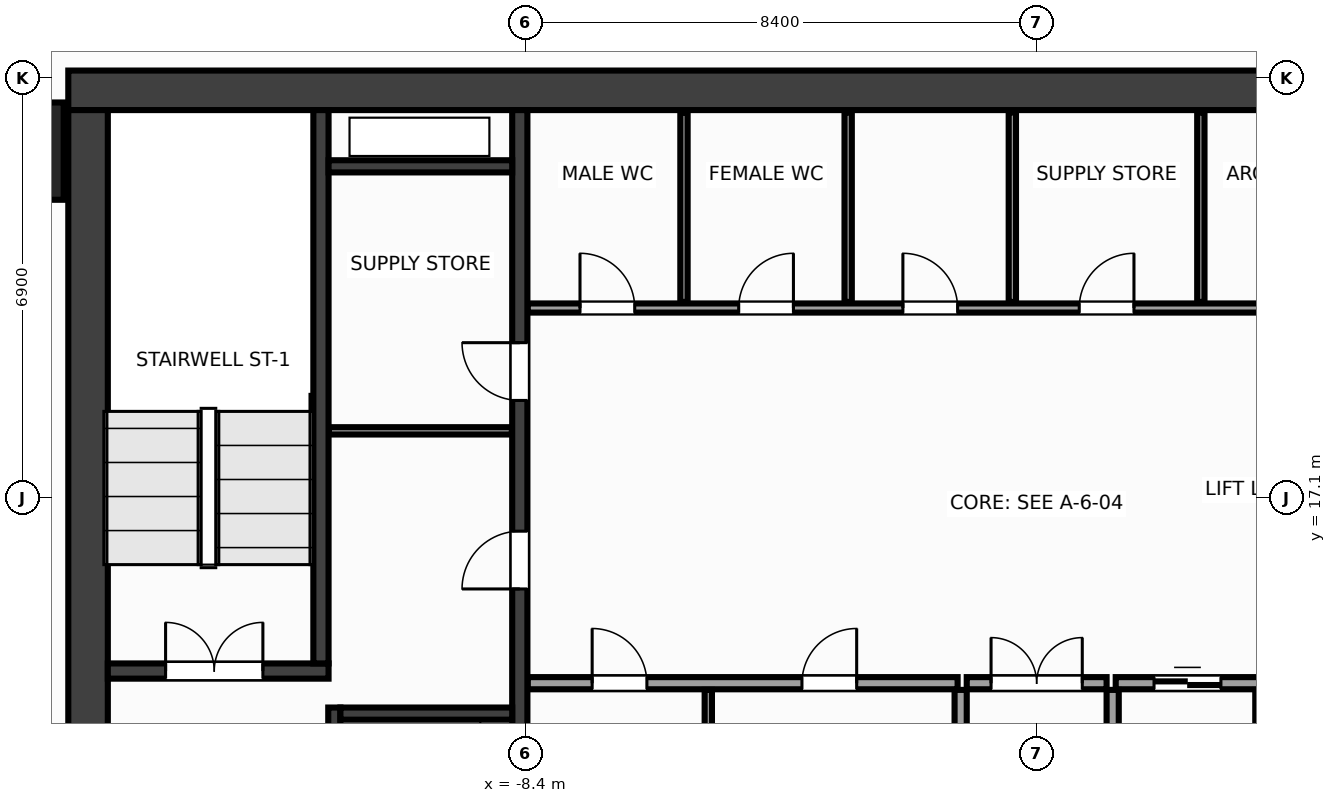
"""IFC4 building model, lengths in metres.
Left out: names, types, materials, properties, quantities, classifications, styles, units other than length and angle.
Written with IfcOpenShell. Run it as: python <this file> out.ifc"""

import sys

from ifc_helpers import new_model, si_unit, direction, frame, frame_2d, origin, origin_2d, place, context, subcontext, project, spatial, rectangle, extrude, source, transform, mapped, element, fill, save


model = new_model("IFC4")
c1 = context("Model", 3, precision=1e-05, world=origin(), true_north=direction((0.0, 1.0)))
c2 = subcontext(c1, "Body", "Model", "MODEL_VIEW")
j1 = project(units=[si_unit("LENGTHUNIT", "METRE"), si_unit("PLANEANGLEUNIT", "RADIAN")], contexts=[c1])
p1 = place(None, origin())
s1 = spatial("IfcSite", under=j1, at=p1, CompositionType="ELEMENT")
p2 = place(p1, origin())
s2 = spatial("IfcBuilding", under=s1, at=p2, CompositionType="ELEMENT")
p3 = place(p2, frame((0.0, 0.0, 95.6)))
s3 = spatial("IfcBuildingStorey", under=s2, at=p3, CompositionType="ELEMENT", Elevation=95.6)
m1 = source(origin(), c2, "Body", "SweptSolid", [
    extrude(rectangle(XDim=31.85, YDim=0.65, at=frame_2d((15.925, 0.0))), origin(), (0.0, 0.0, 1.0), 3.6),
])
p4 = place(p3, frame((-15.925, 23.8, 0.0), z_axis=(0.0, 0.0, 1.0), x_axis=(1.0, 0.0, 0.0)))
e1 = element("IfcWall", 1, at=p4, inside=s3, PredefinedType="SHEAR", context=c2, shape_type="MappedRepresentation", body=[
    mapped(m1, transform((0.0, 0.0, 0.0), x_axis=(1.0, 0.0, 0.0), y_axis=(0.0, 1.0, 0.0), z_axis=(0.0, 0.0, 1.0), scale=1.0)),
])
m2 = source(origin(), c2, "Body", "SweptSolid", [
    extrude(rectangle(XDim=12.95, YDim=0.65, at=frame_2d((6.475, 0.0))), origin(), (0.0, 0.0, 1.0), 3.6),
])
p5 = place(p3, frame((-15.6, 10.525, 0.0), z_axis=(0.0, 0.0, 1.0), x_axis=(0.0, 1.0, 0.0)))
e2 = element("IfcWall", 2, at=p5, inside=s3, PredefinedType="SHEAR", context=c2, shape_type="MappedRepresentation", body=[
    mapped(m2, transform((0.0, 0.0, 0.0), x_axis=(1.0, 0.0, 0.0), y_axis=(0.0, 1.0, 0.0), z_axis=(0.0, 0.0, 1.0), scale=1.0)),
])
m3 = source(origin(), c2, "Body", "SweptSolid", [
    extrude(rectangle(XDim=12.95, YDim=0.25, at=frame_2d((6.475, 0.0))), origin(), (0.0, 0.0, 1.0), 3.6),
])
p6 = place(p3, frame((-8.5, 10.525, 0.0), z_axis=(0.0, 0.0, 1.0), x_axis=(0.0, 1.0, 0.0)))
e3 = element("IfcWall", 3, at=p6, inside=s3, PredefinedType="SHEAR", context=c2, shape_type="MappedRepresentation", body=[
    mapped(m3, transform((0.0, 0.0, 0.0), x_axis=(1.0, 0.0, 0.0), y_axis=(0.0, 1.0, 0.0), z_axis=(0.0, 0.0, 1.0), scale=1.0)),
])
p7 = place(p6, frame((5.075, 0.0, 0.0)))
e4 = element("IfcOpeningElement", 4, at=p7, cuts=e3, PredefinedType="OPENING", context=c2, shape_type="SweptSolid", body=[
    extrude(rectangle(XDim=0.95, YDim=2.15, at=frame_2d((0.475, 1.075))), frame((0.0, 0.137, 0.0), z_axis=(0.0, -1.0, 0.0), x_axis=(1.0, 0.0, 0.0)), (0.0, 0.0, 1.0), 0.274),
])
p8 = place(p6, frame((8.175, 0.0, 0.0)))
e5 = element("IfcOpeningElement", 5, at=p8, cuts=e3, PredefinedType="OPENING", context=c2, shape_type="SweptSolid", body=[
    extrude(rectangle(XDim=0.95, YDim=2.15, at=frame_2d((0.475, 1.075))), frame((0.0, 0.137, 0.0), z_axis=(0.0, -1.0, 0.0), x_axis=(1.0, 0.0, 0.0)), (0.0, 0.0, 1.0), 0.274),
])
m4 = source(origin(), c2, "Body", "SweptSolid", [
    extrude(rectangle(XDim=3.63, YDim=0.25, at=frame_2d((1.815, 0.0))), origin(), (0.0, 0.0, 1.0), 3.6),
])
p9 = place(p3, frame((-15.275, 14.25, 0.0), z_axis=(0.0, 0.0, 1.0), x_axis=(1.0, 0.0, 0.0)))
e6 = element("IfcWall", 6, at=p9, inside=s3, PredefinedType="SHEAR", context=c2, shape_type="MappedRepresentation", body=[
    mapped(m4, transform((0.0, 0.0, 0.0), x_axis=(1.0, 0.0, 0.0), y_axis=(0.0, 1.0, 0.0), z_axis=(0.0, 0.0, 1.0), scale=1.0)),
])
p10 = place(p9, frame((0.95, 0.0, 0.0)))
e7 = element("IfcOpeningElement", 7, at=p10, cuts=e6, PredefinedType="OPENING", context=c2, shape_type="SweptSolid", body=[
    extrude(rectangle(XDim=1.6, YDim=2.15, at=frame_2d((0.8, 1.075))), frame((0.0, 0.137, 0.0), z_axis=(0.0, -1.0, 0.0), x_axis=(1.0, 0.0, 0.0)), (0.0, 0.0, 1.0), 0.274),
])
m5 = source(origin(), c2, "Body", "SweptSolid", [
    extrude(rectangle(XDim=9.1, YDim=0.25, at=frame_2d((4.55, 0.0))), origin(), (0.0, 0.0, 1.0), 3.6),
])
p11 = place(p3, frame((-11.77, 14.375, 0.0), z_axis=(0.0, 0.0, 1.0), x_axis=(0.0, 1.0, 0.0)))
e8 = element("IfcWall", 8, at=p11, inside=s3, PredefinedType="SHEAR", context=c2, shape_type="MappedRepresentation", body=[
    mapped(m5, transform((0.0, 0.0, 0.0), x_axis=(1.0, 0.0, 0.0), y_axis=(0.0, 1.0, 0.0), z_axis=(0.0, 0.0, 1.0), scale=1.0)),
])
m6 = source(origin(), c2, "Body", "SweptSolid", [
    extrude(rectangle(XDim=3.125, YDim=0.2, at=frame_2d((1.562, 0.0))), origin(), (0.0, 0.0, 1.0), 3.6),
])
p12 = place(p3, frame((-11.55, 10.525, 0.0), z_axis=(0.0, 0.0, 1.0), x_axis=(0.0, 1.0, 0.0)))
e9 = element("IfcWall", 9, at=p12, inside=s3, PredefinedType="SHEAR", context=c2, shape_type="MappedRepresentation", body=[
    mapped(m6, transform((0.0, 0.0, 0.0), x_axis=(1.0, 0.0, 0.0), y_axis=(0.0, 1.0, 0.0), z_axis=(0.0, 0.0, 1.0), scale=1.0)),
])
p13 = place(p12, frame((0.9, 0.0, 0.0)))
e10 = element("IfcOpeningElement", 10, at=p13, cuts=e9, PredefinedType="OPENING", context=c2, shape_type="SweptSolid", body=[
    extrude(rectangle(XDim=1.1, YDim=2.15, at=frame_2d((0.55, 1.075))), frame((0.0, 0.112, 0.0), z_axis=(0.0, -1.0, 0.0), x_axis=(1.0, 0.0, 0.0)), (0.0, 0.0, 1.0), 0.224),
])
m7 = source(origin(), c2, "Body", "SweptSolid", [
    extrude(rectangle(XDim=2.825, YDim=0.2, at=frame_2d((1.413, 0.0))), origin(), (0.0, 0.0, 1.0), 3.6),
])
p14 = place(p3, frame((-11.45, 13.55, 0.0), z_axis=(0.0, 0.0, 1.0), x_axis=(1.0, 0.0, 0.0)))
e11 = element("IfcWall", 11, at=p14, inside=s3, PredefinedType="SHEAR", context=c2, shape_type="MappedRepresentation", body=[
    mapped(m7, transform((0.0, 0.0, 0.0), x_axis=(1.0, 0.0, 0.0), y_axis=(0.0, 1.0, 0.0), z_axis=(0.0, 0.0, 1.0), scale=1.0)),
])
m8 = source(origin(), c2, "Body", "SweptSolid", [
    extrude(rectangle(XDim=3.02, YDim=0.2, at=frame_2d((1.51, 0.0))), origin(), (0.0, 0.0, 1.0), 3.6),
])
p15 = place(p3, frame((-11.645, 22.55, 0.0), z_axis=(0.0, 0.0, 1.0), x_axis=(1.0, 0.0, 0.0)))
e12 = element("IfcWall", 12, at=p15, inside=s3, PredefinedType="SHEAR", context=c2, shape_type="MappedRepresentation", body=[
    mapped(m8, transform((0.0, 0.0, 0.0), x_axis=(1.0, 0.0, 0.0), y_axis=(0.0, 1.0, 0.0), z_axis=(0.0, 0.0, 1.0), scale=1.0)),
])
m9 = source(origin(), c2, "Body", "SweptSolid", [
    extrude(rectangle(XDim=1.6, YDim=1.6, at=origin_2d()), origin(), (0.0, 0.0, 1.0), 3.6),
])
p16 = place(p3, frame((-16.8, 22.8, 0.0), z_axis=(0.0, 0.0, 1.0), x_axis=(1.0, 0.0, 0.0)))
e13 = element("IfcColumn", 13, at=p16, inside=s3, PredefinedType="COLUMN", context=c2, shape_type="MappedRepresentation", body=[
    mapped(m9, transform((0.0, 0.0, 0.0), x_axis=(1.0, 0.0, 0.0), y_axis=(0.0, 1.0, 0.0), z_axis=(0.0, 0.0, 1.0), scale=1.0)),
])
m10 = source(origin(), c2, "Body", "SweptSolid", [
    extrude(rectangle(XDim=3.01, YDim=0.12, at=frame_2d((1.505, 0.0))), origin(), (0.0, 0.0, 1.0), 3.36),
])
p17 = place(p3, frame((-11.64, 18.2, 0.0), z_axis=(0.0, 0.0, 1.0), x_axis=(1.0, 0.0, 0.0)))
e14 = element("IfcWall", 14, at=p17, inside=s3, PredefinedType="PARTITIONING", context=c2, shape_type="MappedRepresentation", body=[
    mapped(m10, transform((0.0, 0.0, 0.0), x_axis=(1.0, 0.0, 0.0), y_axis=(0.0, 1.0, 0.0), z_axis=(0.0, 0.0, 1.0), scale=1.0)),
])
m11 = source(origin(), c2, "Body", "SweptSolid", [
    extrude(rectangle(XDim=7.07, YDim=0.2, at=frame_2d((3.535, 0.0))), origin(), (0.0, 0.0, 1.0), 3.36),
])
p18 = place(p3, frame((-8.37, 14.05, 0.0), z_axis=(0.0, 0.0, 1.0), x_axis=(1.0, 0.0, 0.0)))
e15 = element("IfcWall", 15, at=p18, inside=s3, PredefinedType="PARTITIONING", context=c2, shape_type="MappedRepresentation", body=[
    mapped(m11, transform((0.0, 0.0, 0.0), x_axis=(1.0, 0.0, 0.0), y_axis=(0.0, 1.0, 0.0), z_axis=(0.0, 0.0, 1.0), scale=1.0)),
])
p19 = place(p18, frame((1.06, 0.0, 0.0)))
e16 = element("IfcOpeningElement", 16, at=p19, cuts=e15, PredefinedType="OPENING", context=c2, shape_type="SweptSolid", body=[
    extrude(rectangle(XDim=0.9, YDim=2.15, at=frame_2d((0.45, 1.075))), frame((0.0, 0.112, 0.0), z_axis=(0.0, -1.0, 0.0), x_axis=(1.0, 0.0, 0.0)), (0.0, 0.0, 1.0), 0.224),
])
p20 = place(p18, frame((4.51, 0.0, 0.0)))
e17 = element("IfcOpeningElement", 17, at=p20, cuts=e15, PredefinedType="OPENING", context=c2, shape_type="SweptSolid", body=[
    extrude(rectangle(XDim=0.9, YDim=2.15, at=frame_2d((0.45, 1.075))), frame((0.0, 0.112, 0.0), z_axis=(0.0, -1.0, 0.0), x_axis=(1.0, 0.0, 0.0)), (0.0, 0.0, 1.0), 0.224),
])
p21 = place(p3, frame((1.3, 14.05, 0.0), z_axis=(0.0, 0.0, 1.0), x_axis=(1.0, 0.0, 0.0)))
e18 = element("IfcWall", 18, at=p21, inside=s3, PredefinedType="PARTITIONING", context=c2, shape_type="MappedRepresentation", body=[
    mapped(m11, transform((0.0, 0.0, 0.0), x_axis=(1.0, 0.0, 0.0), y_axis=(0.0, 1.0, 0.0), z_axis=(0.0, 0.0, 1.0), scale=1.0)),
])
p22 = place(p21, frame((0.63, 0.0, 0.0)))
e19 = element("IfcOpeningElement", 19, at=p22, cuts=e18, PredefinedType="OPENING", context=c2, shape_type="SweptSolid", body=[
    extrude(rectangle(XDim=1.1, YDim=2.15, at=frame_2d((0.55, 1.075))), frame((0.0, 0.112, 0.0), z_axis=(0.0, -1.0, 0.0), x_axis=(1.0, 0.0, 0.0)), (0.0, 0.0, 1.0), 0.224),
])
p23 = place(p21, frame((2.98, 0.0, 0.0)))
e20 = element("IfcOpeningElement", 20, at=p23, cuts=e18, PredefinedType="OPENING", context=c2, shape_type="SweptSolid", body=[
    extrude(rectangle(XDim=1.1, YDim=2.15, at=frame_2d((0.55, 1.075))), frame((0.0, 0.112, 0.0), z_axis=(0.0, -1.0, 0.0), x_axis=(1.0, 0.0, 0.0)), (0.0, 0.0, 1.0), 0.224),
])
p24 = place(p21, frame((5.33, 0.0, 0.0)))
e21 = element("IfcOpeningElement", 21, at=p24, cuts=e18, PredefinedType="OPENING", context=c2, shape_type="SweptSolid", body=[
    extrude(rectangle(XDim=1.1, YDim=2.15, at=frame_2d((0.55, 1.075))), frame((0.0, 0.112, 0.0), z_axis=(0.0, -1.0, 0.0), x_axis=(1.0, 0.0, 0.0)), (0.0, 0.0, 1.0), 0.224),
])
m12 = source(origin(), c2, "Body", "SweptSolid", [
    extrude(rectangle(XDim=3.415, YDim=0.2, at=frame_2d((1.708, 0.0))), origin(), (0.0, 0.0, 1.0), 3.36),
])
for number, where, z_axis, x_axis in (
    (22, (-1.25, 10.525, 0.0), (0.0, 0.0, 1.0), (0.0, 1.0, 0.0)),
    (23, (1.25, 10.525, 0.0), (0.0, 0.0, 1.0), (0.0, 1.0, 0.0)),
):
    element("IfcWall", number, at=place(p3, frame(where, z_axis=z_axis, x_axis=x_axis)), inside=s3, PredefinedType="PARTITIONING", context=c2, shape_type="MappedRepresentation", body=[
        mapped(m12, transform((0.0, 0.0, 0.0), x_axis=(1.0, 0.0, 0.0), y_axis=(0.0, 1.0, 0.0), z_axis=(0.0, 0.0, 1.0), scale=1.0)),
    ])
m13 = source(origin(), c2, "Body", "SweptSolid", [
    extrude(rectangle(XDim=2.3, YDim=0.2, at=frame_2d((1.15, 0.0))), origin(), (0.0, 0.0, 1.0), 3.36),
])
p25 = place(p3, frame((-1.15, 14.05, 0.0), z_axis=(0.0, 0.0, 1.0), x_axis=(1.0, 0.0, 0.0)))
e24 = element("IfcWall", 24, at=p25, inside=s3, PredefinedType="PARTITIONING", context=c2, shape_type="MappedRepresentation", body=[
    mapped(m13, transform((0.0, 0.0, 0.0), x_axis=(1.0, 0.0, 0.0), y_axis=(0.0, 1.0, 0.0), z_axis=(0.0, 0.0, 1.0), scale=1.0)),
])
p26 = place(p25, frame((0.4, 0.0, 0.0)))
e25 = element("IfcOpeningElement", 25, at=p26, cuts=e24, PredefinedType="OPENING", context=c2, shape_type="SweptSolid", body=[
    extrude(rectangle(XDim=1.5, YDim=2.2, at=frame_2d((0.75, 1.1))), frame((0.0, 0.112, 0.0), z_axis=(0.0, -1.0, 0.0), x_axis=(1.0, 0.0, 0.0)), (0.0, 0.0, 1.0), 0.224),
])
m14 = source(origin(), c2, "Body", "SweptSolid", [
    extrude(rectangle(XDim=14.59, YDim=0.15, at=frame_2d((7.295, 0.0))), origin(), (0.0, 0.0, 1.0), 3.36),
])
p27 = place(p3, frame((-8.37, 20.22, 0.0), z_axis=(0.0, 0.0, 1.0), x_axis=(1.0, 0.0, 0.0)))
e26 = element("IfcWall", 26, at=p27, inside=s3, PredefinedType="PARTITIONING", context=c2, shape_type="MappedRepresentation", body=[
    mapped(m14, transform((0.0, 0.0, 0.0), x_axis=(1.0, 0.0, 0.0), y_axis=(0.0, 1.0, 0.0), z_axis=(0.0, 0.0, 1.0), scale=1.0)),
])
p28 = place(p27, frame((0.86, 0.0, 0.0)))
e27 = element("IfcOpeningElement", 27, at=p28, cuts=e26, PredefinedType="OPENING", context=c2, shape_type="SweptSolid", body=[
    extrude(rectangle(XDim=0.9, YDim=2.15, at=frame_2d((0.45, 1.075))), frame((0.0, 0.087, 0.0), z_axis=(0.0, -1.0, 0.0), x_axis=(1.0, 0.0, 0.0)), (0.0, 0.0, 1.0), 0.174),
])
p29 = place(p27, frame((3.47, 0.0, 0.0)))
e28 = element("IfcOpeningElement", 28, at=p29, cuts=e26, PredefinedType="OPENING", context=c2, shape_type="SweptSolid", body=[
    extrude(rectangle(XDim=0.9, YDim=2.15, at=frame_2d((0.45, 1.075))), frame((0.0, 0.087, 0.0), z_axis=(0.0, -1.0, 0.0), x_axis=(1.0, 0.0, 0.0)), (0.0, 0.0, 1.0), 0.174),
])
p30 = place(p27, frame((6.17, 0.0, 0.0)))
e29 = element("IfcOpeningElement", 29, at=p30, cuts=e26, PredefinedType="OPENING", context=c2, shape_type="SweptSolid", body=[
    extrude(rectangle(XDim=0.9, YDim=2.15, at=frame_2d((0.45, 1.075))), frame((0.0, 0.087, 0.0), z_axis=(0.0, -1.0, 0.0), x_axis=(1.0, 0.0, 0.0)), (0.0, 0.0, 1.0), 0.174),
])
p31 = place(p27, frame((9.07, 0.0, 0.0)))
e30 = element("IfcOpeningElement", 30, at=p31, cuts=e26, PredefinedType="OPENING", context=c2, shape_type="SweptSolid", body=[
    extrude(rectangle(XDim=0.9, YDim=2.15, at=frame_2d((0.45, 1.075))), frame((0.0, 0.087, 0.0), z_axis=(0.0, -1.0, 0.0), x_axis=(1.0, 0.0, 0.0)), (0.0, 0.0, 1.0), 0.174),
])
p32 = place(p27, frame((12.32, 0.0, 0.0)))
e31 = element("IfcOpeningElement", 31, at=p32, cuts=e26, PredefinedType="OPENING", context=c2, shape_type="SweptSolid", body=[
    extrude(rectangle(XDim=0.9, YDim=2.15, at=frame_2d((0.45, 1.075))), frame((0.0, 0.087, 0.0), z_axis=(0.0, -1.0, 0.0), x_axis=(1.0, 0.0, 0.0)), (0.0, 0.0, 1.0), 0.174),
])
m15 = source(origin(), c2, "Body", "SweptSolid", [
    extrude(rectangle(XDim=3.415, YDim=0.12, at=frame_2d((1.708, 0.0))), origin(), (0.0, 0.0, 1.0), 3.36),
])
p33 = place(p3, frame((-5.4, 10.525, 0.0), z_axis=(0.0, 0.0, 1.0), x_axis=(0.0, 1.0, 0.0)))
e32 = element("IfcWall", 32, at=p33, inside=s3, PredefinedType="PARTITIONING", context=c2, shape_type="MappedRepresentation", body=[
    mapped(m15, transform((0.0, 0.0, 0.0), x_axis=(1.0, 0.0, 0.0), y_axis=(0.0, 1.0, 0.0), z_axis=(0.0, 0.0, 1.0), scale=1.0)),
])
m16 = source(origin(), c2, "Body", "SweptSolid", [
    extrude(rectangle(XDim=3.415, YDim=0.15, at=frame_2d((1.708, 0.0))), origin(), (0.0, 0.0, 1.0), 3.36),
])
p34 = place(p3, frame((3.67, 10.525, 0.0), z_axis=(0.0, 0.0, 1.0), x_axis=(0.0, 1.0, 0.0)))
e33 = element("IfcWall", 33, at=p34, inside=s3, PredefinedType="PARTITIONING", context=c2, shape_type="MappedRepresentation", body=[
    mapped(m16, transform((0.0, 0.0, 0.0), x_axis=(1.0, 0.0, 0.0), y_axis=(0.0, 1.0, 0.0), z_axis=(0.0, 0.0, 1.0), scale=1.0)),
])
m17 = source(origin(), c2, "Body", "SweptSolid", [
    extrude(rectangle(XDim=3.115, YDim=0.12, at=frame_2d((1.558, 0.0))), origin(), (0.0, 0.0, 1.0), 3.36),
])
for number, where, z_axis, x_axis in (
    (34, (-5.8, 20.32, 0.0), (0.0, 0.0, 1.0), (0.0, 1.0, 0.0)),
    (35, (-3.1, 20.32, 0.0), (0.0, 0.0, 1.0), (0.0, 1.0, 0.0)),
    (36, (-0.4, 20.32, 0.0), (0.0, 0.0, 1.0), (0.0, 1.0, 0.0)),
    (37, (2.7, 20.32, 0.0), (0.0, 0.0, 1.0), (0.0, 1.0, 0.0)),
):
    element("IfcWall", number, at=place(p3, frame(where, z_axis=z_axis, x_axis=x_axis)), inside=s3, PredefinedType="PARTITIONING", context=c2, shape_type="MappedRepresentation", body=[
        mapped(m17, transform((0.0, 0.0, 0.0), x_axis=(1.0, 0.0, 0.0), y_axis=(0.0, 1.0, 0.0), z_axis=(0.0, 0.0, 1.0), scale=1.0)),
    ])
m18 = source(origin(), c2, "Body", "SweptSolid", [
    extrude(rectangle(XDim=1.6, YDim=2.15, at=frame_2d((0.8, 1.075))), frame((0.0, 0.025, 0.0), z_axis=(0.0, -1.0, 0.0), x_axis=(1.0, 0.0, 0.0)), (0.0, 0.0, 1.0), 0.05),
])
p35 = place(p10, origin())
e38 = element("IfcDoor", 38, at=p35, inside=s3, OperationType="DOUBLE_DOOR_SINGLE_SWING", PredefinedType="DOOR", context=c2, shape_type="MappedRepresentation", body=[
    mapped(m18, transform((0.0, 0.0, 0.0), x_axis=(1.0, 0.0, 0.0), y_axis=(0.0, 1.0, 0.0), z_axis=(0.0, 0.0, 1.0), scale=1.0)),
])
fill(e7, e38)
m19 = source(origin(), c2, "Body", "SweptSolid", [
    extrude(rectangle(XDim=0.95, YDim=2.15, at=frame_2d((0.475, 1.075))), frame((0.0, 0.025, 0.0), z_axis=(0.0, -1.0, 0.0), x_axis=(1.0, 0.0, 0.0)), (0.0, 0.0, 1.0), 0.05),
])
p36 = place(p7, origin())
e39 = element("IfcDoor", 39, at=p36, inside=s3, OperationType="SINGLE_SWING_LEFT", PredefinedType="DOOR", context=c2, shape_type="MappedRepresentation", body=[
    mapped(m19, transform((0.0, 0.0, 0.0), x_axis=(1.0, 0.0, 0.0), y_axis=(0.0, 1.0, 0.0), z_axis=(0.0, 0.0, 1.0), scale=1.0)),
])
fill(e4, e39)
p37 = place(p8, origin())
e40 = element("IfcDoor", 40, at=p37, inside=s3, OperationType="SINGLE_SWING_RIGHT", PredefinedType="DOOR", context=c2, shape_type="MappedRepresentation", body=[
    mapped(m19, transform((0.0, 0.0, 0.0), x_axis=(1.0, 0.0, 0.0), y_axis=(0.0, 1.0, 0.0), z_axis=(0.0, 0.0, 1.0), scale=1.0)),
])
fill(e5, e40)
m20 = source(origin(), c2, "Body", "SweptSolid", [
    extrude(rectangle(XDim=0.9, YDim=2.15, at=frame_2d((0.45, 1.075))), frame((0.0, 0.025, 0.0), z_axis=(0.0, -1.0, 0.0), x_axis=(1.0, 0.0, 0.0)), (0.0, 0.0, 1.0), 0.05),
])
p38 = place(p19, origin())
e41 = element("IfcDoor", 41, at=p38, inside=s3, OperationType="SINGLE_SWING_LEFT", PredefinedType="DOOR", context=c2, shape_type="MappedRepresentation", body=[
    mapped(m20, transform((0.0, 0.0, 0.0), x_axis=(1.0, 0.0, 0.0), y_axis=(0.0, 1.0, 0.0), z_axis=(0.0, 0.0, 1.0), scale=1.0)),
])
fill(e16, e41)
p39 = place(p20, origin())
e42 = element("IfcDoor", 42, at=p39, inside=s3, OperationType="SINGLE_SWING_RIGHT", PredefinedType="DOOR", context=c2, shape_type="MappedRepresentation", body=[
    mapped(m20, transform((0.0, 0.0, 0.0), x_axis=(1.0, 0.0, 0.0), y_axis=(0.0, 1.0, 0.0), z_axis=(0.0, 0.0, 1.0), scale=1.0)),
])
fill(e17, e42)
m21 = source(origin(), c2, "Body", "SweptSolid", [
    extrude(rectangle(XDim=1.1, YDim=2.15, at=frame_2d((0.55, 1.075))), frame((0.0, 0.025, 0.0), z_axis=(0.0, -1.0, 0.0), x_axis=(1.0, 0.0, 0.0)), (0.0, 0.0, 1.0), 0.05),
])
p40 = place(p22, origin())
e43 = element("IfcDoor", 43, at=p40, inside=s3, OperationType="DOUBLE_DOOR_SLIDING", PredefinedType="DOOR", context=c2, shape_type="MappedRepresentation", body=[
    mapped(m21, transform((0.0, 0.0, 0.0), x_axis=(1.0, 0.0, 0.0), y_axis=(0.0, 1.0, 0.0), z_axis=(0.0, 0.0, 1.0), scale=1.0)),
])
fill(e19, e43)
m22 = source(origin(), c2, "Body", "SweptSolid", [
    extrude(rectangle(XDim=1.5, YDim=2.2, at=frame_2d((0.75, 1.1))), frame((0.0, 0.025, 0.0), z_axis=(0.0, -1.0, 0.0), x_axis=(1.0, 0.0, 0.0)), (0.0, 0.0, 1.0), 0.05),
])
p41 = place(p26, origin())
e44 = element("IfcDoor", 44, at=p41, inside=s3, OperationType="DOUBLE_DOOR_SINGLE_SWING", PredefinedType="DOOR", context=c2, shape_type="MappedRepresentation", body=[
    mapped(m22, transform((0.0, 0.0, 0.0), x_axis=(1.0, 0.0, 0.0), y_axis=(0.0, 1.0, 0.0), z_axis=(0.0, 0.0, 1.0), scale=1.0)),
])
fill(e25, e44)
p42 = place(p28, origin())
e45 = element("IfcDoor", 45, at=p42, inside=s3, OperationType="SINGLE_SWING_LEFT", PredefinedType="DOOR", context=c2, shape_type="MappedRepresentation", body=[
    mapped(m20, transform((0.0, 0.0, 0.0), x_axis=(1.0, 0.0, 0.0), y_axis=(0.0, 1.0, 0.0), z_axis=(0.0, 0.0, 1.0), scale=1.0)),
])
fill(e27, e45)
p43 = place(p29, origin())
e46 = element("IfcDoor", 46, at=p43, inside=s3, OperationType="SINGLE_SWING_RIGHT", PredefinedType="DOOR", context=c2, shape_type="MappedRepresentation", body=[
    mapped(m20, transform((0.0, 0.0, 0.0), x_axis=(1.0, 0.0, 0.0), y_axis=(0.0, 1.0, 0.0), z_axis=(0.0, 0.0, 1.0), scale=1.0)),
])
fill(e28, e46)
p44 = place(p30, origin())
e47 = element("IfcDoor", 47, at=p44, inside=s3, OperationType="SINGLE_SWING_LEFT", PredefinedType="DOOR", context=c2, shape_type="MappedRepresentation", body=[
    mapped(m20, transform((0.0, 0.0, 0.0), x_axis=(1.0, 0.0, 0.0), y_axis=(0.0, 1.0, 0.0), z_axis=(0.0, 0.0, 1.0), scale=1.0)),
])
fill(e29, e47)
p45 = place(p31, origin())
e48 = element("IfcDoor", 48, at=p45, inside=s3, OperationType="SINGLE_SWING_RIGHT", PredefinedType="DOOR", context=c2, shape_type="MappedRepresentation", body=[
    mapped(m20, transform((0.0, 0.0, 0.0), x_axis=(1.0, 0.0, 0.0), y_axis=(0.0, 1.0, 0.0), z_axis=(0.0, 0.0, 1.0), scale=1.0)),
])
fill(e30, e48)
save(model, sys.argv[1])
